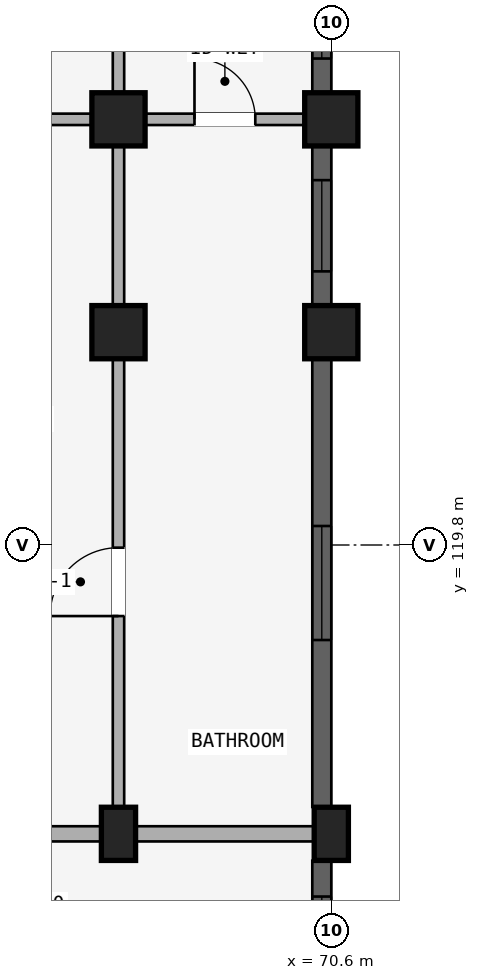
"""IFC4 building model, lengths in metres.
Left out: names, types, materials, properties, quantities, classifications, styles, units other than length and angle.
Written with IfcOpenShell. Run it as: python <this file> out.ifc"""

import sys

from ifc_helpers import new_model, si_unit, direction, frame, frame_2d, origin, origin_2d, place, context, subcontext, project, spatial, rectangle, extrude, element, fill, save


model = new_model("IFC4")
c1 = context("Model", 3, precision=1e-05, world=origin(), true_north=direction((0.0, 1.0)))
c2 = subcontext(c1, "Body", "Model", "MODEL_VIEW")
j1 = project(units=[si_unit("LENGTHUNIT", "METRE"), si_unit("PLANEANGLEUNIT", "RADIAN")], contexts=[c1])
p1 = place(None, origin())
s1 = spatial("IfcSite", under=j1, at=p1, CompositionType="ELEMENT")
p2 = place(p1, origin())
s2 = spatial("IfcBuilding", under=s1, at=p2, CompositionType="ELEMENT")
p3 = place(p2, frame((0.0, 0.0, 24.45)))
s3 = spatial("IfcBuildingStorey", under=s2, at=p3, CompositionType="ELEMENT", Elevation=24.45)
p4 = place(p3, frame((67.8, 116.0, 0.0), z_axis=(0.0, 0.0, 1.0), x_axis=(1.0, 0.0, 0.0)))
e1 = element("IfcColumn", 1, at=p4, inside=s3, PredefinedType="COLUMN", context=c2, shape_type="SweptSolid", body=[
    extrude(rectangle(XDim=0.45, YDim=0.7, at=origin_2d()), origin(), (0.0, 0.0, 1.0), 2.93),
])
for number, where, z_axis, x_axis in (
    (2, (67.8, 122.6, 0.0), (0.0, 0.0, 1.0), (1.0, 0.0, 0.0)),
    (3, (67.8, 125.4, 0.0), (0.0, 0.0, 1.0), (1.0, 0.0, 0.0)),
):
    element("IfcColumn", number, at=place(p3, frame(where, z_axis=z_axis, x_axis=x_axis)), inside=s3, PredefinedType="COLUMN", context=c2, shape_type="SweptSolid", body=[
        extrude(rectangle(XDim=0.7, YDim=0.7, at=origin_2d()), origin(), (0.0, 0.0, 1.0), 2.93),
    ])
p5 = place(p3, frame((70.6, 116.0, 0.0), z_axis=(0.0, 0.0, 1.0), x_axis=(1.0, 0.0, 0.0)))
e4 = element("IfcColumn", 4, at=p5, inside=s3, PredefinedType="COLUMN", context=c2, shape_type="SweptSolid", body=[
    extrude(rectangle(XDim=0.45, YDim=0.7, at=origin_2d()), origin(), (0.0, 0.0, 1.0), 2.93),
])
for number, where, z_axis, x_axis in (
    (5, (70.6, 122.6, 0.0), (0.0, 0.0, 1.0), (1.0, 0.0, 0.0)),
    (6, (70.6, 125.4, 0.0), (0.0, 0.0, 1.0), (1.0, 0.0, 0.0)),
):
    element("IfcColumn", number, at=place(p3, frame(where, z_axis=z_axis, x_axis=x_axis)), inside=s3, PredefinedType="COLUMN", context=c2, shape_type="SweptSolid", body=[
        extrude(rectangle(XDim=0.7, YDim=0.7, at=origin_2d()), origin(), (0.0, 0.0, 1.0), 2.93),
    ])
p6 = place(p3, frame((65.0, 116.0, 0.0), z_axis=(0.0, 0.0, 1.0), x_axis=(1.0, 0.0, 0.0)))
e7 = element("IfcWall", 7, at=p6, inside=s3, PredefinedType="STANDARD", context=c2, shape_type="SweptSolid", body=[
    extrude(rectangle(XDim=2.8, YDim=0.2, at=frame_2d((1.4, 0.0))), origin(), (0.0, 0.0, 1.0), 2.372),
])
p7 = place(p6, frame((0.9, 0.0, 0.0)))
e8 = element("IfcOpeningElement", 8, at=p7, cuts=e7, PredefinedType="OPENING", context=c2, shape_type="SweptSolid", body=[
    extrude(rectangle(XDim=1.0, YDim=2.15, at=frame_2d((0.5, 1.075))), frame((0.0, 0.11, 0.0), z_axis=(0.0, -1.0, 0.0), x_axis=(1.0, 0.0, 0.0)), (0.0, 0.0, 1.0), 0.22),
])
p8 = place(p3, frame((65.08, 125.4, 0.0), z_axis=(0.0, 0.0, 1.0), x_axis=(1.0, 0.0, 0.0)))
e9 = element("IfcWall", 9, at=p8, inside=s3, PredefinedType="PLUMBINGWALL", context=c2, shape_type="SweptSolid", body=[
    extrude(rectangle(XDim=2.64, YDim=0.15, at=frame_2d((1.32, 0.0))), origin(), (0.0, 0.0, 1.0), 2.372),
])
p9 = place(p8, frame((0.87, 0.0, 0.0)))
e10 = element("IfcOpeningElement", 10, at=p9, cuts=e9, PredefinedType="OPENING", context=c2, shape_type="SweptSolid", body=[
    extrude(rectangle(XDim=0.9, YDim=2.1, at=frame_2d((0.45, 1.05))), frame((0.0, 0.085, 0.0), z_axis=(0.0, -1.0, 0.0), x_axis=(1.0, 0.0, 0.0)), (0.0, 0.0, 1.0), 0.17),
])
p10 = place(p3, frame((67.8, 116.0, 0.0), z_axis=(0.0, 0.0, 1.0), x_axis=(1.0, 0.0, 0.0)))
e11 = element("IfcWall", 11, at=p10, inside=s3, PredefinedType="STANDARD", context=c2, shape_type="SweptSolid", body=[
    extrude(rectangle(XDim=2.8, YDim=0.2, at=frame_2d((1.4, 0.0))), origin(), (0.0, 0.0, 1.0), 2.372),
])
p11 = place(p3, frame((67.88, 125.4, 0.0), z_axis=(0.0, 0.0, 1.0), x_axis=(1.0, 0.0, 0.0)))
e12 = element("IfcWall", 12, at=p11, inside=s3, PredefinedType="PLUMBINGWALL", context=c2, shape_type="SweptSolid", body=[
    extrude(rectangle(XDim=2.64, YDim=0.15, at=frame_2d((1.32, 0.0))), origin(), (0.0, 0.0, 1.0), 2.372),
])
p12 = place(p11, frame((0.92, 0.0, 0.0)))
e13 = element("IfcOpeningElement", 13, at=p12, cuts=e12, PredefinedType="OPENING", context=c2, shape_type="SweptSolid", body=[
    extrude(rectangle(XDim=0.8, YDim=2.1, at=frame_2d((0.4, 1.05))), frame((0.0, 0.085, 0.0), z_axis=(0.0, -1.0, 0.0), x_axis=(1.0, 0.0, 0.0)), (0.0, 0.0, 1.0), 0.17),
])
p13 = place(p3, frame((67.8, 116.05, 0.0), z_axis=(0.0, 0.0, 1.0), x_axis=(0.0, 1.0, 0.0)))
e14 = element("IfcWall", 14, at=p13, inside=s3, PredefinedType="PARTITIONING", context=c2, shape_type="SweptSolid", body=[
    extrude(rectangle(XDim=6.53, YDim=0.15, at=frame_2d((3.265, 0.0))), origin(), (0.0, 0.0, 1.0), 2.372),
])
p14 = place(p13, frame((2.815, 0.0, 0.0)))
e15 = element("IfcOpeningElement", 15, at=p14, cuts=e14, PredefinedType="OPENING", context=c2, shape_type="SweptSolid", body=[
    extrude(rectangle(XDim=0.9, YDim=2.1, at=frame_2d((0.45, 1.05))), frame((0.0, 0.085, 0.0), z_axis=(0.0, -1.0, 0.0), x_axis=(1.0, 0.0, 0.0)), (0.0, 0.0, 1.0), 0.17),
])
p15 = place(p3, frame((67.8, 122.7, 0.0), z_axis=(0.0, 0.0, 1.0), x_axis=(0.0, 1.0, 0.0)))
e16 = element("IfcWall", 16, at=p15, inside=s3, PredefinedType="PARTITIONING", context=c2, shape_type="SweptSolid", body=[
    extrude(rectangle(XDim=10.82, YDim=0.15, at=frame_2d((5.41, 0.0))), origin(), (0.0, 0.0, 1.0), 2.372),
])
p16 = place(p15, frame((3.7, 0.0, 0.0)))
e17 = element("IfcOpeningElement", 17, at=p16, cuts=e16, PredefinedType="OPENING", context=c2, shape_type="SweptSolid", body=[
    extrude(rectangle(XDim=0.8, YDim=2.1, at=frame_2d((0.4, 1.05))), frame((0.0, 0.085, 0.0), z_axis=(0.0, -1.0, 0.0), x_axis=(1.0, 0.0, 0.0)), (0.0, 0.0, 1.0), 0.17),
])
p17 = place(p3, frame((70.475, 113.954, 0.0), z_axis=(0.0, 0.0, 1.0), x_axis=(0.0, 1.0, 0.0)))
e18 = element("IfcWall", 18, at=p17, inside=s3, PredefinedType="STANDARD", context=c2, shape_type="SweptSolid", body=[
    extrude(rectangle(XDim=1.693, YDim=0.25, at=frame_2d((0.846, 0.0))), origin(), (0.0, 0.0, 1.0), 2.372),
])
p18 = place(p17, frame((0.471, 0.0, 0.88)))
e19 = element("IfcOpeningElement", 19, at=p18, cuts=e18, PredefinedType="OPENING", context=c2, shape_type="SweptSolid", body=[
    extrude(rectangle(XDim=0.75, YDim=1.05, at=frame_2d((0.375, 0.525))), frame((0.0, 0.135, 0.0), z_axis=(0.0, -1.0, 0.0), x_axis=(1.0, 0.0, 0.0)), (0.0, 0.0, 1.0), 0.27),
])
p19 = place(p3, frame((70.475, 116.354, 0.0), z_axis=(0.0, 0.0, 1.0), x_axis=(0.0, 1.0, 0.0)))
e20 = element("IfcWall", 20, at=p19, inside=s3, PredefinedType="STANDARD", context=c2, shape_type="SweptSolid", body=[
    extrude(rectangle(XDim=5.893, YDim=0.25, at=frame_2d((2.947, 0.0))), origin(), (0.0, 0.0, 1.0), 2.372),
])
p20 = place(p19, frame((2.197, 0.0, 0.522)))
e21 = element("IfcOpeningElement", 21, at=p20, cuts=e20, PredefinedType="OPENING", context=c2, shape_type="SweptSolid", body=[
    extrude(rectangle(XDim=1.5, YDim=1.65, at=frame_2d((0.75, 0.825))), frame((0.0, 0.135, 0.0), z_axis=(0.0, -1.0, 0.0), x_axis=(1.0, 0.0, 0.0)), (0.0, 0.0, 1.0), 0.27),
])
p21 = place(p3, frame((70.475, 122.954, 0.0), z_axis=(0.0, 0.0, 1.0), x_axis=(0.0, 1.0, 0.0)))
e22 = element("IfcWall", 22, at=p21, inside=s3, PredefinedType="STANDARD", context=c2, shape_type="SweptSolid", body=[
    extrude(rectangle(XDim=2.093, YDim=0.25, at=frame_2d((1.046, 0.0))), origin(), (0.0, 0.0, 1.0), 2.372),
])
p22 = place(p21, frame((0.447, 0.0, 0.672)))
e23 = element("IfcOpeningElement", 23, at=p22, cuts=e22, PredefinedType="OPENING", context=c2, shape_type="SweptSolid", body=[
    extrude(rectangle(XDim=1.2, YDim=1.5, at=frame_2d((0.6, 0.75))), frame((0.0, 0.135, 0.0), z_axis=(0.0, -1.0, 0.0), x_axis=(1.0, 0.0, 0.0)), (0.0, 0.0, 1.0), 0.27),
])
p23 = place(p3, frame((70.475, 125.753, 0.0), z_axis=(0.0, 0.0, 1.0), x_axis=(0.0, 1.0, 0.0)))
e24 = element("IfcWall", 24, at=p23, inside=s3, PredefinedType="STANDARD", context=c2, shape_type="SweptSolid", body=[
    extrude(rectangle(XDim=2.093, YDim=0.25, at=frame_2d((1.046, 0.0))), origin(), (0.0, 0.0, 1.0), 2.372),
])
p24 = place(p23, frame((0.447, 0.0, 0.672)))
e25 = element("IfcOpeningElement", 25, at=p24, cuts=e24, PredefinedType="OPENING", context=c2, shape_type="SweptSolid", body=[
    extrude(rectangle(XDim=1.2, YDim=1.5, at=frame_2d((0.6, 0.75))), frame((0.0, 0.135, 0.0), z_axis=(0.0, -1.0, 0.0), x_axis=(1.0, 0.0, 0.0)), (0.0, 0.0, 1.0), 0.27),
])
p25 = place(p18, origin())
e26 = element("IfcWindow", 26, at=p25, inside=s3, PartitioningType="SINGLE_PANEL", PredefinedType="WINDOW", context=c2, shape_type="SweptSolid", body=[
    extrude(rectangle(XDim=0.75, YDim=1.05, at=frame_2d((0.375, 0.525))), frame((0.0, 0.03, 0.0), z_axis=(0.0, -1.0, 0.0), x_axis=(1.0, 0.0, 0.0)), (0.0, 0.0, 1.0), 0.06),
])
fill(e19, e26)
p26 = place(p20, origin())
e27 = element("IfcWindow", 27, at=p26, inside=s3, PartitioningType="DOUBLE_PANEL_VERTICAL", PredefinedType="WINDOW", context=c2, shape_type="SweptSolid", body=[
    extrude(rectangle(XDim=1.5, YDim=1.65, at=frame_2d((0.75, 0.825))), frame((0.0, 0.03, 0.0), z_axis=(0.0, -1.0, 0.0), x_axis=(1.0, 0.0, 0.0)), (0.0, 0.0, 1.0), 0.06),
])
fill(e21, e27)
p27 = place(p22, origin())
e28 = element("IfcWindow", 28, at=p27, inside=s3, PartitioningType="SINGLE_PANEL", PredefinedType="WINDOW", context=c2, shape_type="SweptSolid", body=[
    extrude(rectangle(XDim=1.2, YDim=1.5, at=frame_2d((0.6, 0.75))), frame((0.0, 0.03, 0.0), z_axis=(0.0, -1.0, 0.0), x_axis=(1.0, 0.0, 0.0)), (0.0, 0.0, 1.0), 0.06),
])
fill(e23, e28)
p28 = place(p24, origin())
e29 = element("IfcWindow", 29, at=p28, inside=s3, PartitioningType="SINGLE_PANEL", PredefinedType="WINDOW", context=c2, shape_type="SweptSolid", body=[
    extrude(rectangle(XDim=1.2, YDim=1.5, at=frame_2d((0.6, 0.75))), frame((0.0, 0.03, 0.0), z_axis=(0.0, -1.0, 0.0), x_axis=(1.0, 0.0, 0.0)), (0.0, 0.0, 1.0), 0.06),
])
fill(e25, e29)
p29 = place(p12, frame((0.8, 0.0, 0.0), z_axis=(0.0, 0.0, 1.0), x_axis=(-1.0, 0.0, 0.0)))
e30 = element("IfcDoor", 30, at=p29, inside=s3, OperationType="SINGLE_SWING_RIGHT", PredefinedType="DOOR", context=c2, shape_type="SweptSolid", body=[
    extrude(rectangle(XDim=0.8, YDim=2.1, at=frame_2d((0.4, 1.05))), frame((0.0, 0.025, 0.0), z_axis=(0.0, -1.0, 0.0), x_axis=(1.0, 0.0, 0.0)), (0.0, 0.0, 1.0), 0.05),
])
fill(e13, e30)
p30 = place(p14, frame((0.9, 0.0, 0.0), z_axis=(0.0, 0.0, 1.0), x_axis=(-1.0, 0.0, 0.0)))
e31 = element("IfcDoor", 31, at=p30, inside=s3, OperationType="SINGLE_SWING_RIGHT", PredefinedType="DOOR", context=c2, shape_type="SweptSolid", body=[
    extrude(rectangle(XDim=0.9, YDim=2.1, at=frame_2d((0.45, 1.05))), frame((0.0, 0.025, 0.0), z_axis=(0.0, -1.0, 0.0), x_axis=(1.0, 0.0, 0.0)), (0.0, 0.0, 1.0), 0.05),
])
fill(e15, e31)
save(model, sys.argv[1])
